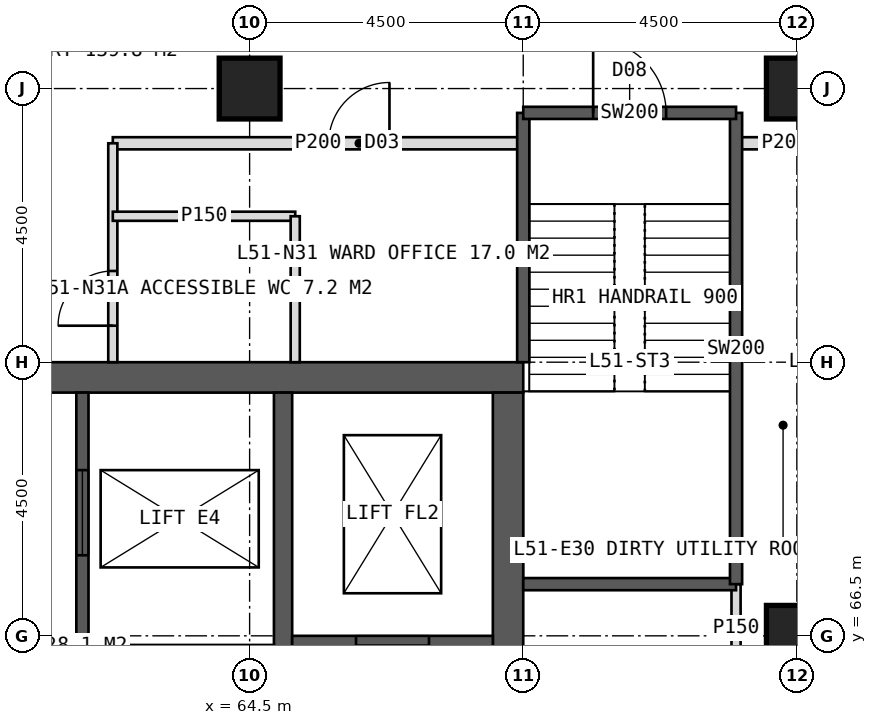
"""IFC4 building model, lengths in metres.
Left out: names, types, materials, properties, quantities, classifications, styles, units other than length and angle.
Written with IfcOpenShell. Run it as: python <this file> out.ifc"""

import sys

from ifc_helpers import new_model, si_unit, direction, frame, frame_2d, origin, origin_2d, place, context, subcontext, project, spatial, rectangle, hollow_rectangle, extrude, element, fill, save


model = new_model("IFC4")
c1 = context("Model", 3, precision=1e-05, world=origin(), true_north=direction((0.0, 1.0)))
c2 = subcontext(c1, "Body", "Model", "MODEL_VIEW")
j1 = project(units=[si_unit("LENGTHUNIT", "METRE"), si_unit("PLANEANGLEUNIT", "RADIAN")], contexts=[c1])
p1 = place(None, origin())
s1 = spatial("IfcSite", under=j1, at=p1, CompositionType="ELEMENT")
p2 = place(p1, origin())
s2 = spatial("IfcBuilding", under=s1, at=p2, CompositionType="ELEMENT")
p3 = place(p2, frame((0.0, 0.0, 213.0)))
s3 = spatial("IfcBuildingStorey", under=s2, at=p3, CompositionType="ELEMENT", Elevation=213.0)
p4 = place(p3, frame((51.0, 70.75, 0.0), z_axis=(0.0, 0.0, 1.0), x_axis=(1.0, 0.0, 0.0)))
e1 = element("IfcWall", 1, at=p4, inside=s3, PredefinedType="SHEAR", context=c2, shape_type="SweptSolid", body=[
    extrude(rectangle(XDim=18.0, YDim=0.5, at=frame_2d((9.0, 0.0))), origin(), (0.0, 0.0, 1.0), 4.0),
])
p5 = place(p4, frame((8.1, 0.0, 0.0)))
e2 = element("IfcOpeningElement", 2, at=p5, cuts=e1, PredefinedType="OPENING", context=c2, shape_type="SweptSolid", body=[
    extrude(rectangle(XDim=1.8, YDim=2.2, at=frame_2d((0.9, 1.1))), frame((0.0, 0.26, 0.0), z_axis=(0.0, -1.0, 0.0), x_axis=(1.0, 0.0, 0.0)), (0.0, 0.0, 1.0), 0.52),
])
p6 = place(p3, frame((68.75, 53.5, 0.0), z_axis=(0.0, 0.0, 1.0), x_axis=(0.0, 1.0, 0.0)))
e3 = element("IfcWall", 3, at=p6, inside=s3, PredefinedType="SHEAR", context=c2, shape_type="SweptSolid", body=[
    extrude(rectangle(XDim=17.0, YDim=0.5, at=frame_2d((8.5, 0.0))), origin(), (0.0, 0.0, 1.0), 4.0),
])
p7 = place(p6, frame((9.6, 0.0, 0.0)))
e4 = element("IfcOpeningElement", 4, at=p7, cuts=e3, PredefinedType="OPENING", context=c2, shape_type="SweptSolid", body=[
    extrude(rectangle(XDim=1.5, YDim=2.2, at=frame_2d((0.75, 1.1))), frame((0.0, 0.26, 0.0), z_axis=(0.0, -1.0, 0.0), x_axis=(1.0, 0.0, 0.0)), (0.0, 0.0, 1.0), 0.52),
])
p8 = place(p3, frame((65.05, 53.5, 0.0), z_axis=(0.0, 0.0, 1.0), x_axis=(0.0, 1.0, 0.0)))
e5 = element("IfcWall", 5, at=p8, inside=s3, PredefinedType="SHEAR", context=c2, shape_type="SweptSolid", body=[
    extrude(rectangle(XDim=17.0, YDim=0.3, at=frame_2d((8.5, 0.0))), origin(), (0.0, 0.0, 1.0), 4.0),
])
p9 = place(p3, frame((61.75, 53.5, 0.0), z_axis=(0.0, 0.0, 1.0), x_axis=(0.0, 1.0, 0.0)))
e6 = element("IfcWall", 6, at=p9, inside=s3, PredefinedType="SHEAR", context=c2, shape_type="SweptSolid", body=[
    extrude(rectangle(XDim=17.0, YDim=0.2, at=frame_2d((8.5, 0.0))), origin(), (0.0, 0.0, 1.0), 4.0),
])
p10 = place(p9, frame((0.393, 0.0, 0.0)))
e7 = element("IfcOpeningElement", 7, at=p10, cuts=e6, PredefinedType="OPENING", context=c2, shape_type="SweptSolid", body=[
    extrude(rectangle(XDim=1.0, YDim=2.1, at=frame_2d((0.5, 1.05))), frame((0.0, 0.11, 0.0), z_axis=(0.0, -1.0, 0.0), x_axis=(1.0, 0.0, 0.0)), (0.0, 0.0, 1.0), 0.22),
])
p11 = place(p9, frame((2.542, 0.0, 0.0)))
e8 = element("IfcOpeningElement", 8, at=p11, cuts=e6, PredefinedType="OPENING", context=c2, shape_type="SweptSolid", body=[
    extrude(rectangle(XDim=1.0, YDim=2.1, at=frame_2d((0.5, 1.05))), frame((0.0, 0.11, 0.0), z_axis=(0.0, -1.0, 0.0), x_axis=(1.0, 0.0, 0.0)), (0.0, 0.0, 1.0), 0.22),
])
p12 = place(p9, frame((5.127, 0.0, 0.0)))
e9 = element("IfcOpeningElement", 9, at=p12, cuts=e6, PredefinedType="OPENING", context=c2, shape_type="SweptSolid", body=[
    extrude(rectangle(XDim=1.0, YDim=2.1, at=frame_2d((0.5, 1.05))), frame((0.0, 0.11, 0.0), z_axis=(0.0, -1.0, 0.0), x_axis=(1.0, 0.0, 0.0)), (0.0, 0.0, 1.0), 0.22),
])
p13 = place(p9, frame((7.228, 0.0, 0.0)))
e10 = element("IfcOpeningElement", 10, at=p13, cuts=e6, PredefinedType="OPENING", context=c2, shape_type="SweptSolid", body=[
    extrude(rectangle(XDim=1.0, YDim=2.1, at=frame_2d((0.5, 1.05))), frame((0.0, 0.11, 0.0), z_axis=(0.0, -1.0, 0.0), x_axis=(1.0, 0.0, 0.0)), (0.0, 0.0, 1.0), 0.22),
])
p14 = place(p9, frame((10.025, 0.0, 0.0)))
e11 = element("IfcOpeningElement", 11, at=p14, cuts=e6, PredefinedType="OPENING", context=c2, shape_type="SweptSolid", body=[
    extrude(rectangle(XDim=1.4, YDim=2.2, at=frame_2d((0.7, 1.1))), frame((0.0, 0.11, 0.0), z_axis=(0.0, -1.0, 0.0), x_axis=(1.0, 0.0, 0.0)), (0.0, 0.0, 1.0), 0.22),
])
p15 = place(p9, frame((14.325, 0.0, 0.0)))
e12 = element("IfcOpeningElement", 12, at=p15, cuts=e6, PredefinedType="OPENING", context=c2, shape_type="SweptSolid", body=[
    extrude(rectangle(XDim=1.4, YDim=2.2, at=frame_2d((0.7, 1.1))), frame((0.0, 0.11, 0.0), z_axis=(0.0, -1.0, 0.0), x_axis=(1.0, 0.0, 0.0)), (0.0, 0.0, 1.0), 0.22),
])
p16 = place(p3, frame((65.2, 66.35, 0.0), z_axis=(0.0, 0.0, 1.0), x_axis=(1.0, 0.0, 0.0)))
e13 = element("IfcWall", 13, at=p16, inside=s3, PredefinedType="SHEAR", context=c2, shape_type="SweptSolid", body=[
    extrude(rectangle(XDim=3.3, YDim=0.3, at=frame_2d((1.65, 0.0))), origin(), (0.0, 0.0, 1.0), 4.0),
])
p17 = place(p16, frame((1.05, 0.0, 0.0)))
e14 = element("IfcOpeningElement", 14, at=p17, cuts=e13, PredefinedType="OPENING", context=c2, shape_type="SweptSolid", body=[
    extrude(rectangle(XDim=1.2, YDim=2.2, at=frame_2d((0.6, 1.1))), frame((0.0, 0.16, 0.0), z_axis=(0.0, -1.0, 0.0), x_axis=(1.0, 0.0, 0.0)), (0.0, 0.0, 1.0), 0.32),
])
for number, where, z_axis, x_axis in (
    (15, (73.5, 75.5, 0.0), (0.0, 0.0, 1.0), (1.0, 0.0, 0.0)),
    (16, (64.5, 75.5, 0.0), (0.0, 0.0, 1.0), (1.0, 0.0, 0.0)),
    (17, (73.5, 66.5, 0.0), (0.0, 0.0, 1.0), (1.0, 0.0, 0.0)),
):
    element("IfcColumn", number, at=place(p3, frame(where, z_axis=z_axis, x_axis=x_axis)), inside=s3, PredefinedType="COLUMN", context=c2, shape_type="SweptSolid", body=[
        extrude(hollow_rectangle(XDim=1.0, YDim=1.0, WallThickness=0.1, at=origin_2d()), origin(), (0.0, 0.0, 1.0), 4.0),
    ])
p18 = place(p3, frame((62.25, 74.6, 0.0), z_axis=(0.0, 0.0, 1.0), x_axis=(1.0, 0.0, 0.0)))
e18 = element("IfcWall", 18, at=p18, inside=s3, PredefinedType="PARTITIONING", context=c2, shape_type="SweptSolid", body=[
    extrude(rectangle(XDim=6.75, YDim=0.2, at=frame_2d((3.375, 0.0))), origin(), (0.0, 0.0, 1.0), 3.75),
])
p19 = place(p18, frame((3.55, 0.0, 0.0)))
e19 = element("IfcOpeningElement", 19, at=p19, cuts=e18, PredefinedType="OPENING", context=c2, shape_type="SweptSolid", body=[
    extrude(rectangle(XDim=1.0, YDim=2.1, at=frame_2d((0.5, 1.05))), frame((0.0, 0.11, 0.0), z_axis=(0.0, -1.0, 0.0), x_axis=(1.0, 0.0, 0.0)), (0.0, 0.0, 1.0), 0.22),
])
p20 = place(p3, frame((72.5, 74.6, 0.0), z_axis=(0.0, 0.0, 1.0), x_axis=(1.0, 0.0, 0.0)))
e20 = element("IfcWall", 20, at=p20, inside=s3, PredefinedType="PARTITIONING", context=c2, shape_type="SweptSolid", body=[
    extrude(rectangle(XDim=1.6, YDim=0.2, at=frame_2d((0.8, 0.0))), origin(), (0.0, 0.0, 1.0), 3.75),
])
p21 = place(p3, frame((62.25, 71.0, 0.0), z_axis=(0.0, 0.0, 1.0), x_axis=(0.0, 1.0, 0.0)))
e21 = element("IfcWall", 21, at=p21, inside=s3, PredefinedType="PARTITIONING", context=c2, shape_type="SweptSolid", body=[
    extrude(rectangle(XDim=3.6, YDim=0.15, at=frame_2d((1.8, 0.0))), origin(), (0.0, 0.0, 1.0), 3.75),
])
p22 = place(p21, frame((0.6, 0.0, 0.0)))
e22 = element("IfcOpeningElement", 22, at=p22, cuts=e21, PredefinedType="OPENING", context=c2, shape_type="SweptSolid", body=[
    extrude(rectangle(XDim=0.9, YDim=2.1, at=frame_2d((0.45, 1.05))), frame((0.0, 0.085, 0.0), z_axis=(0.0, -1.0, 0.0), x_axis=(1.0, 0.0, 0.0)), (0.0, 0.0, 1.0), 0.17),
])
p23 = place(p3, frame((62.25, 73.4, 0.0), z_axis=(0.0, 0.0, 1.0), x_axis=(1.0, 0.0, 0.0)))
e23 = element("IfcWall", 23, at=p23, inside=s3, PredefinedType="PARTITIONING", context=c2, shape_type="SweptSolid", body=[
    extrude(rectangle(XDim=3.0, YDim=0.15, at=frame_2d((1.5, 0.0))), origin(), (0.0, 0.0, 1.0), 3.75),
])
p24 = place(p3, frame((65.25, 71.0, 0.0), z_axis=(0.0, 0.0, 1.0), x_axis=(0.0, 1.0, 0.0)))
e24 = element("IfcWall", 24, at=p24, inside=s3, PredefinedType="PARTITIONING", context=c2, shape_type="SweptSolid", body=[
    extrude(rectangle(XDim=2.4, YDim=0.15, at=frame_2d((1.2, 0.0))), origin(), (0.0, 0.0, 1.0), 3.75),
])
p25 = place(p3, frame((72.5, 65.9, 0.0), z_axis=(0.0, 0.0, 1.0), x_axis=(0.0, 1.0, 0.0)))
e25 = element("IfcWall", 25, at=p25, inside=s3, PredefinedType="PARTITIONING", context=c2, shape_type="SweptSolid", body=[
    extrude(rectangle(XDim=1.45, YDim=0.15, at=frame_2d((0.725, 0.0))), origin(), (0.0, 0.0, 1.0), 3.75),
])
p26 = place(p3, frame((69.0, 71.0, 0.0), z_axis=(0.0, 0.0, 1.0), x_axis=(0.0, 1.0, 0.0)))
e26 = element("IfcWall", 26, at=p26, inside=s3, PredefinedType="SOLIDWALL", context=c2, shape_type="SweptSolid", body=[
    extrude(rectangle(XDim=4.1, YDim=0.2, at=frame_2d((2.05, 0.0))), origin(), (0.0, 0.0, 1.0), 3.75),
])
p27 = place(p3, frame((69.0, 67.35, 0.0), z_axis=(0.0, 0.0, 1.0), x_axis=(1.0, 0.0, 0.0)))
e27 = element("IfcWall", 27, at=p27, inside=s3, PredefinedType="SOLIDWALL", context=c2, shape_type="SweptSolid", body=[
    extrude(rectangle(XDim=3.5, YDim=0.2, at=frame_2d((1.75, 0.0))), origin(), (0.0, 0.0, 1.0), 3.75),
])
p28 = place(p3, frame((72.5, 67.35, 0.0), z_axis=(0.0, 0.0, 1.0), x_axis=(0.0, 1.0, 0.0)))
e28 = element("IfcWall", 28, at=p28, inside=s3, PredefinedType="SOLIDWALL", context=c2, shape_type="SweptSolid", body=[
    extrude(rectangle(XDim=7.75, YDim=0.2, at=frame_2d((3.875, 0.0))), origin(), (0.0, 0.0, 1.0), 3.75),
])
p29 = place(p3, frame((69.0, 75.1, 0.0), z_axis=(0.0, 0.0, 1.0), x_axis=(1.0, 0.0, 0.0)))
e29 = element("IfcWall", 29, at=p29, inside=s3, PredefinedType="SOLIDWALL", context=c2, shape_type="SweptSolid", body=[
    extrude(rectangle(XDim=3.5, YDim=0.2, at=frame_2d((1.75, 0.0))), origin(), (0.0, 0.0, 1.0), 3.75),
])
p30 = place(p29, frame((1.15, 0.0, 0.0)))
e30 = element("IfcOpeningElement", 30, at=p30, cuts=e29, PredefinedType="OPENING", context=c2, shape_type="SweptSolid", body=[
    extrude(rectangle(XDim=1.2, YDim=2.1, at=frame_2d((0.6, 1.05))), frame((0.0, 0.11, 0.0), z_axis=(0.0, -1.0, 0.0), x_axis=(1.0, 0.0, 0.0)), (0.0, 0.0, 1.0), 0.22),
])
p31 = place(p22, origin())
e31 = element("IfcDoor", 31, at=p31, inside=s3, OperationType="SINGLE_SWING_LEFT", PredefinedType="DOOR", context=c2, shape_type="SweptSolid", body=[
    extrude(rectangle(XDim=0.9, YDim=2.1, at=frame_2d((0.45, 1.05))), frame((0.0, 0.025, 0.0), z_axis=(0.0, -1.0, 0.0), x_axis=(1.0, 0.0, 0.0)), (0.0, 0.0, 1.0), 0.05),
])
fill(e22, e31)
p32 = place(p19, origin())
e32 = element("IfcDoor", 32, at=p32, inside=s3, OperationType="SINGLE_SWING_RIGHT", PredefinedType="DOOR", context=c2, shape_type="SweptSolid", body=[
    extrude(rectangle(XDim=1.0, YDim=2.1, at=frame_2d((0.5, 1.05))), frame((0.0, 0.025, 0.0), z_axis=(0.0, -1.0, 0.0), x_axis=(1.0, 0.0, 0.0)), (0.0, 0.0, 1.0), 0.05),
])
fill(e19, e32)
p33 = place(p17, origin())
e33 = element("IfcDoor", 33, at=p33, inside=s3, OperationType="SLIDING_TO_LEFT", PredefinedType="DOOR", context=c2, shape_type="SweptSolid", body=[
    extrude(rectangle(XDim=1.2, YDim=2.2, at=frame_2d((0.6, 1.1))), frame((0.0, 0.025, 0.0), z_axis=(0.0, -1.0, 0.0), x_axis=(1.0, 0.0, 0.0)), (0.0, 0.0, 1.0), 0.05),
])
fill(e14, e33)
p34 = place(p15, origin())
e34 = element("IfcDoor", 34, at=p34, inside=s3, OperationType="SLIDING_TO_LEFT", PredefinedType="DOOR", context=c2, shape_type="SweptSolid", body=[
    extrude(rectangle(XDim=1.4, YDim=2.2, at=frame_2d((0.7, 1.1))), frame((0.0, 0.025, 0.0), z_axis=(0.0, -1.0, 0.0), x_axis=(1.0, 0.0, 0.0)), (0.0, 0.0, 1.0), 0.05),
])
fill(e12, e34)
p35 = place(p30, origin())
e35 = element("IfcDoor", 35, at=p35, inside=s3, OperationType="SINGLE_SWING_LEFT", PredefinedType="DOOR", context=c2, shape_type="SweptSolid", body=[
    extrude(rectangle(XDim=1.2, YDim=2.1, at=frame_2d((0.6, 1.05))), frame((0.0, 0.025, 0.0), z_axis=(0.0, -1.0, 0.0), x_axis=(1.0, 0.0, 0.0)), (0.0, 0.0, 1.0), 0.05),
])
fill(e30, e35)
save(model, sys.argv[1])
